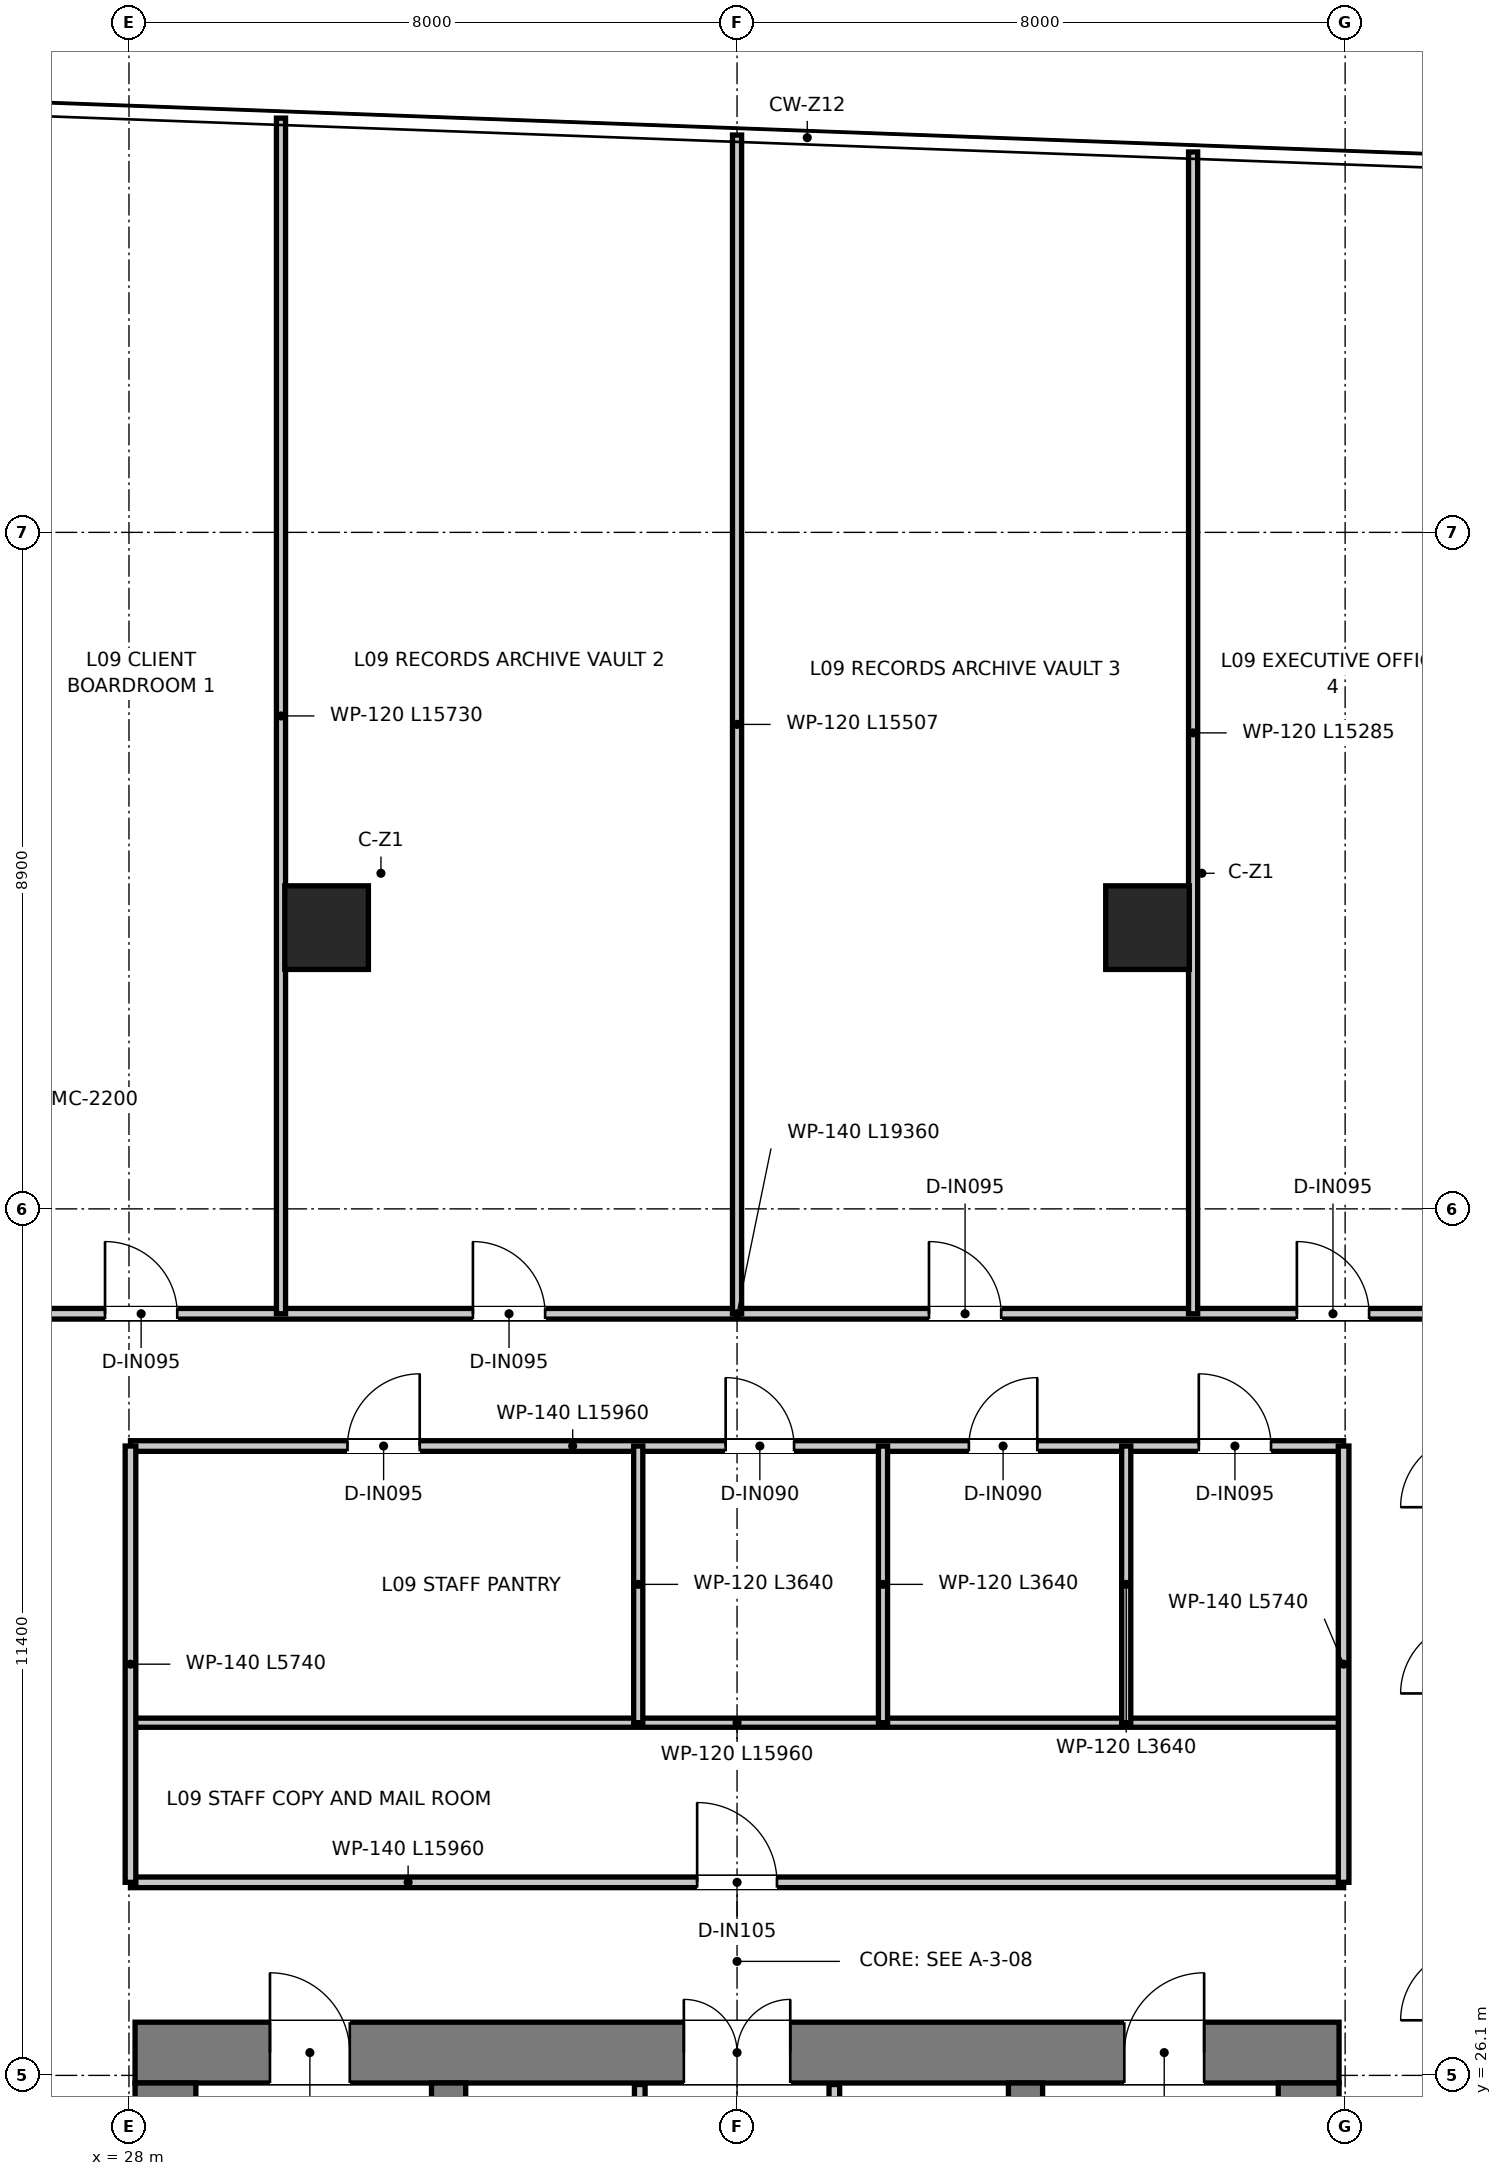
"""IFC4 building model, lengths in metres.
Left out: names, types, materials, properties, quantities, classifications, styles, units other than length and angle.
Written with IfcOpenShell. Run it as: python <this file> out.ifc"""

import sys

from ifc_helpers import new_model, si_unit, direction, frame, frame_2d, origin, origin_2d, place, context, subcontext, project, spatial, rectangle, extrude, source, transform, mapped, element, fill, save


model = new_model("IFC4")
c1 = context("Model", 3, precision=1e-05, world=origin(), true_north=direction((0.0, 1.0)))
c2 = subcontext(c1, "Body", "Model", "MODEL_VIEW")
j1 = project(units=[si_unit("LENGTHUNIT", "METRE"), si_unit("PLANEANGLEUNIT", "RADIAN")], contexts=[c1])
p1 = place(None, origin())
s1 = spatial("IfcSite", under=j1, at=p1, CompositionType="ELEMENT")
p2 = place(p1, origin())
s2 = spatial("IfcBuilding", under=s1, at=p2, CompositionType="ELEMENT")
p3 = place(p2, frame((0.0, 0.0, 40.8)))
s3 = spatial("IfcBuildingStorey", under=s2, at=p3, CompositionType="ELEMENT", Elevation=40.8)
p4 = place(p3, frame((28.08, 26.4, 0.0), z_axis=(0.0, 0.0, 1.0), x_axis=(1.0, 0.0, 0.0)))
e1 = element("IfcWall", 1, at=p4, inside=s3, PredefinedType="SHEAR", context=c2, shape_type="SweptSolid", body=[
    extrude(rectangle(XDim=15.84, YDim=0.8, at=frame_2d((7.92, 0.0))), origin(), (0.0, 0.0, 1.0), 3.95),
])
p5 = place(p4, frame((7.22, 0.0, 0.0)))
e2 = element("IfcOpeningElement", 2, at=p5, cuts=e1, PredefinedType="OPENING", context=c2, shape_type="SweptSolid", body=[
    extrude(rectangle(XDim=1.4, YDim=2.2, at=frame_2d((0.7, 1.1))), frame((0.0, 0.41, 0.0), z_axis=(0.0, -1.0, 0.0), x_axis=(1.0, 0.0, 0.0)), (0.0, 0.0, 1.0), 0.82),
])
p6 = place(p4, frame((1.775, 0.0, 0.0)))
e3 = element("IfcOpeningElement", 3, at=p6, cuts=e1, PredefinedType="OPENING", context=c2, shape_type="SweptSolid", body=[
    extrude(rectangle(XDim=1.05, YDim=2.1, at=frame_2d((0.525, 1.05))), frame((0.0, 0.41, 0.0), z_axis=(0.0, -1.0, 0.0), x_axis=(1.0, 0.0, 0.0)), (0.0, 0.0, 1.0), 0.82),
])
p7 = place(p4, frame((13.015, 0.0, 0.0)))
e4 = element("IfcOpeningElement", 4, at=p7, cuts=e1, PredefinedType="OPENING", context=c2, shape_type="SweptSolid", body=[
    extrude(rectangle(XDim=1.05, YDim=2.1, at=frame_2d((0.525, 1.05))), frame((0.0, 0.41, 0.0), z_axis=(0.0, -1.0, 0.0), x_axis=(1.0, 0.0, 0.0)), (0.0, 0.0, 1.0), 0.82),
])
for number, where, z_axis, x_axis in (
    (5, (28.48, 11.3, 0.0), (0.0, 0.0, 1.0), (0.0, 1.0, 0.0)),
    (6, (43.52, 11.3, 0.0), (0.0, 0.0, 1.0), (0.0, 1.0, 0.0)),
):
    element("IfcWall", number, at=place(p3, frame(where, z_axis=z_axis, x_axis=x_axis)), inside=s3, PredefinedType="SHEAR", context=c2, shape_type="SweptSolid", body=[
        extrude(rectangle(XDim=14.7, YDim=0.8, at=frame_2d((7.35, 0.0))), origin(), (0.0, 0.0, 1.0), 3.95),
    ])
p8 = place(p3, frame((32.205, 13.22, 0.0), z_axis=(0.0, 0.0, 1.0), x_axis=(0.0, 1.0, 0.0)))
e7 = element("IfcWall", 7, at=p8, inside=s3, PredefinedType="SHEAR", context=c2, shape_type="SweptSolid", body=[
    extrude(rectangle(XDim=12.78, YDim=0.45, at=frame_2d((6.39, 0.0))), origin(), (0.0, 0.0, 1.0), 3.95),
])
p9 = place(p8, frame((10.58, 0.0, 0.0)))
e8 = element("IfcOpeningElement", 8, at=p9, cuts=e7, PredefinedType="OPENING", context=c2, shape_type="SweptSolid", body=[
    extrude(rectangle(XDim=1.1, YDim=2.15, at=frame_2d((0.55, 1.075))), frame((0.0, 0.235, 0.0), z_axis=(0.0, -1.0, 0.0), x_axis=(1.0, 0.0, 0.0)), (0.0, 0.0, 1.0), 0.47),
])
p10 = place(p3, frame((39.795, 13.22, 0.0), z_axis=(0.0, 0.0, 1.0), x_axis=(0.0, 1.0, 0.0)))
e9 = element("IfcWall", 9, at=p10, inside=s3, PredefinedType="SHEAR", context=c2, shape_type="SweptSolid", body=[
    extrude(rectangle(XDim=12.78, YDim=0.45, at=frame_2d((6.39, 0.0))), origin(), (0.0, 0.0, 1.0), 3.95),
])
p11 = place(p10, frame((10.58, 0.0, 0.0)))
e10 = element("IfcOpeningElement", 10, at=p11, cuts=e9, PredefinedType="OPENING", context=c2, shape_type="SweptSolid", body=[
    extrude(rectangle(XDim=1.1, YDim=2.15, at=frame_2d((0.55, 1.075))), frame((0.0, 0.235, 0.0), z_axis=(0.0, -1.0, 0.0), x_axis=(1.0, 0.0, 0.0)), (0.0, 0.0, 1.0), 0.47),
])
m1 = source(origin(), c2, "Body", "SweptSolid", [
    extrude(rectangle(XDim=1.1, YDim=1.1, at=origin_2d()), origin(), (0.0, 0.0, 1.0), 3.95),
])
for number, where, z_axis, x_axis in (
    (11, (30.6, 41.2, 0.0), (0.0, 0.0, 1.0), (1.0, 0.0, 0.0)),
    (12, (41.4, 41.2, 0.0), (0.0, 0.0, 1.0), (1.0, 0.0, 0.0)),
):
    element("IfcColumn", number, at=place(p3, frame(where, z_axis=z_axis, x_axis=x_axis)), inside=s3, PredefinedType="COLUMN", context=c2, shape_type="MappedRepresentation", body=[
        mapped(m1, transform((0.0, 0.0, 0.0), x_axis=(1.0, 0.0, 0.0), y_axis=(0.0, 1.0, 0.0), z_axis=(0.0, 0.0, 1.0), scale=1.0)),
    ])
p12 = place(p3, frame((34.72, 20.2, 0.0), z_axis=(0.0, 0.0, 1.0), x_axis=(0.0, 1.0, 0.0)))
e13 = element("IfcWall", 13, at=p12, inside=s3, PredefinedType="PARTITIONING", context=c2, shape_type="SweptSolid", body=[
    extrude(rectangle(XDim=5.78, YDim=0.14, at=frame_2d((2.89, 0.0))), origin(), (0.0, 0.0, 1.0), 2.47),
])
p13 = place(p12, frame((1.05, 0.0, 0.0)))
e14 = element("IfcOpeningElement", 14, at=p13, cuts=e13, PredefinedType="OPENING", context=c2, shape_type="SweptSolid", body=[
    extrude(rectangle(XDim=0.9, YDim=2.1, at=frame_2d((0.45, 1.05))), frame((0.0, 0.08, 0.0), z_axis=(0.0, -1.0, 0.0), x_axis=(1.0, 0.0, 0.0)), (0.0, 0.0, 1.0), 0.16),
])
p14 = place(p3, frame((37.28, 20.2, 0.0), z_axis=(0.0, 0.0, 1.0), x_axis=(0.0, 1.0, 0.0)))
e15 = element("IfcWall", 15, at=p14, inside=s3, PredefinedType="PARTITIONING", context=c2, shape_type="SweptSolid", body=[
    extrude(rectangle(XDim=5.78, YDim=0.14, at=frame_2d((2.89, 0.0))), origin(), (0.0, 0.0, 1.0), 2.47),
])
p15 = place(p14, frame((0.95, 0.0, 0.0)))
e16 = element("IfcOpeningElement", 16, at=p15, cuts=e15, PredefinedType="OPENING", context=c2, shape_type="SweptSolid", body=[
    extrude(rectangle(XDim=1.1, YDim=2.15, at=frame_2d((0.55, 1.075))), frame((0.0, 0.08, 0.0), z_axis=(0.0, -1.0, 0.0), x_axis=(1.0, 0.0, 0.0)), (0.0, 0.0, 1.0), 0.16),
])
p16 = place(p3, frame((28.02, 28.64, 0.0), z_axis=(0.0, 0.0, 1.0), x_axis=(1.0, 0.0, 0.0)))
e17 = element("IfcWall", 17, at=p16, inside=s3, PredefinedType="PARTITIONING", context=c2, shape_type="SweptSolid", body=[
    extrude(rectangle(XDim=15.96, YDim=0.14, at=frame_2d((7.98, 0.0))), origin(), (0.0, 0.0, 1.0), 3.08),
])
p17 = place(p16, frame((7.455, 0.0, 0.0)))
e18 = element("IfcOpeningElement", 18, at=p17, cuts=e17, PredefinedType="OPENING", context=c2, shape_type="SweptSolid", body=[
    extrude(rectangle(XDim=1.05, YDim=2.15, at=frame_2d((0.525, 1.075))), frame((0.0, 0.08, 0.0), z_axis=(0.0, -1.0, 0.0), x_axis=(1.0, 0.0, 0.0)), (0.0, 0.0, 1.0), 0.16),
])
p18 = place(p3, frame((28.02, 30.74, 0.0), z_axis=(0.0, 0.0, 1.0), x_axis=(1.0, 0.0, 0.0)))
e19 = element("IfcWall", 19, at=p18, inside=s3, PredefinedType="PARTITIONING", context=c2, shape_type="SweptSolid", body=[
    extrude(rectangle(XDim=15.96, YDim=0.12, at=frame_2d((7.98, 0.0))), origin(), (0.0, 0.0, 1.0), 3.08),
])
p19 = place(p3, frame((28.02, 34.38, 0.0), z_axis=(0.0, 0.0, 1.0), x_axis=(1.0, 0.0, 0.0)))
e20 = element("IfcWall", 20, at=p19, inside=s3, PredefinedType="PARTITIONING", context=c2, shape_type="SweptSolid", body=[
    extrude(rectangle(XDim=15.96, YDim=0.14, at=frame_2d((7.98, 0.0))), origin(), (0.0, 0.0, 1.0), 3.08),
])
p20 = place(p19, frame((7.83, 0.0, 0.0)))
e21 = element("IfcOpeningElement", 21, at=p20, cuts=e20, PredefinedType="OPENING", context=c2, shape_type="SweptSolid", body=[
    extrude(rectangle(XDim=0.9, YDim=2.1, at=frame_2d((0.45, 1.05))), frame((0.0, 0.08, 0.0), z_axis=(0.0, -1.0, 0.0), x_axis=(1.0, 0.0, 0.0)), (0.0, 0.0, 1.0), 0.16),
])
p21 = place(p19, frame((11.03, 0.0, 0.0)))
e22 = element("IfcOpeningElement", 22, at=p21, cuts=e20, PredefinedType="OPENING", context=c2, shape_type="SweptSolid", body=[
    extrude(rectangle(XDim=0.9, YDim=2.1, at=frame_2d((0.45, 1.05))), frame((0.0, 0.08, 0.0), z_axis=(0.0, -1.0, 0.0), x_axis=(1.0, 0.0, 0.0)), (0.0, 0.0, 1.0), 0.16),
])
p22 = place(p19, frame((14.055, 0.0, 0.0)))
e23 = element("IfcOpeningElement", 23, at=p22, cuts=e20, PredefinedType="OPENING", context=c2, shape_type="SweptSolid", body=[
    extrude(rectangle(XDim=0.95, YDim=2.1, at=frame_2d((0.475, 1.05))), frame((0.0, 0.08, 0.0), z_axis=(0.0, -1.0, 0.0), x_axis=(1.0, 0.0, 0.0)), (0.0, 0.0, 1.0), 0.16),
])
p23 = place(p19, frame((2.855, 0.0, 0.0)))
e24 = element("IfcOpeningElement", 24, at=p23, cuts=e20, PredefinedType="OPENING", context=c2, shape_type="SweptSolid", body=[
    extrude(rectangle(XDim=0.95, YDim=2.1, at=frame_2d((0.475, 1.05))), frame((0.0, 0.08, 0.0), z_axis=(0.0, -1.0, 0.0), x_axis=(1.0, 0.0, 0.0)), (0.0, 0.0, 1.0), 0.16),
])
for number, where, z_axis, x_axis in (
    (25, (28.02, 28.64, 0.0), (0.0, 0.0, 1.0), (0.0, 1.0, 0.0)),
    (26, (43.98, 28.64, 0.0), (0.0, 0.0, 1.0), (0.0, 1.0, 0.0)),
):
    element("IfcWall", number, at=place(p3, frame(where, z_axis=z_axis, x_axis=x_axis)), inside=s3, PredefinedType="PARTITIONING", context=c2, shape_type="SweptSolid", body=[
        extrude(rectangle(XDim=5.74, YDim=0.14, at=frame_2d((2.87, 0.0))), origin(), (0.0, 0.0, 1.0), 3.22),
    ])
for number, where, z_axis, x_axis in (
    (27, (37.92, 30.74, 0.0), (0.0, 0.0, 1.0), (0.0, 1.0, 0.0)),
    (28, (41.12, 30.74, 0.0), (0.0, 0.0, 1.0), (0.0, 1.0, 0.0)),
    (29, (34.7, 30.74, 0.0), (0.0, 0.0, 1.0), (0.0, 1.0, 0.0)),
):
    element("IfcWall", number, at=place(p3, frame(where, z_axis=z_axis, x_axis=x_axis)), inside=s3, PredefinedType="PARTITIONING", context=c2, shape_type="SweptSolid", body=[
        extrude(rectangle(XDim=3.64, YDim=0.12, at=frame_2d((1.82, 0.0))), origin(), (0.0, 0.0, 1.0), 3.12),
    ])
p24 = place(p3, frame((26.32, 36.12, 0.0), z_axis=(0.0, 0.0, 1.0), x_axis=(1.0, 0.0, 0.0)))
e30 = element("IfcWall", 30, at=p24, inside=s3, PredefinedType="PARTITIONING", context=c2, shape_type="SweptSolid", body=[
    extrude(rectangle(XDim=19.36, YDim=0.14, at=frame_2d((9.68, 0.0))), origin(), (0.0, 0.0, 1.0), 3.08),
])
p25 = place(p24, frame((1.365, 0.0, 0.0)))
e31 = element("IfcOpeningElement", 31, at=p25, cuts=e30, PredefinedType="OPENING", context=c2, shape_type="SweptSolid", body=[
    extrude(rectangle(XDim=0.95, YDim=2.1, at=frame_2d((0.475, 1.05))), frame((0.0, 0.08, 0.0), z_axis=(0.0, -1.0, 0.0), x_axis=(1.0, 0.0, 0.0)), (0.0, 0.0, 1.0), 0.16),
])
p26 = place(p24, frame((6.205, 0.0, 0.0)))
e32 = element("IfcOpeningElement", 32, at=p26, cuts=e30, PredefinedType="OPENING", context=c2, shape_type="SweptSolid", body=[
    extrude(rectangle(XDim=0.95, YDim=2.1, at=frame_2d((0.475, 1.05))), frame((0.0, 0.08, 0.0), z_axis=(0.0, -1.0, 0.0), x_axis=(1.0, 0.0, 0.0)), (0.0, 0.0, 1.0), 0.16),
])
p27 = place(p24, frame((12.205, 0.0, 0.0)))
e33 = element("IfcOpeningElement", 33, at=p27, cuts=e30, PredefinedType="OPENING", context=c2, shape_type="SweptSolid", body=[
    extrude(rectangle(XDim=0.95, YDim=2.1, at=frame_2d((0.475, 1.05))), frame((0.0, 0.08, 0.0), z_axis=(0.0, -1.0, 0.0), x_axis=(1.0, 0.0, 0.0)), (0.0, 0.0, 1.0), 0.16),
])
p28 = place(p24, frame((17.045, 0.0, 0.0)))
e34 = element("IfcOpeningElement", 34, at=p28, cuts=e30, PredefinedType="OPENING", context=c2, shape_type="SweptSolid", body=[
    extrude(rectangle(XDim=0.95, YDim=2.1, at=frame_2d((0.475, 1.05))), frame((0.0, 0.08, 0.0), z_axis=(0.0, -1.0, 0.0), x_axis=(1.0, 0.0, 0.0)), (0.0, 0.0, 1.0), 0.16),
])
p29 = place(p3, frame((30.0, 36.12, 0.0), z_axis=(0.0, 0.0, 1.0), x_axis=(0.0, 1.0, 0.0)))
e35 = element("IfcWall", 35, at=p29, inside=s3, PredefinedType="PARTITIONING", context=c2, shape_type="SweptSolid", body=[
    extrude(rectangle(XDim=15.73, YDim=0.12, at=frame_2d((7.865, 0.0))), origin(), (0.0, 0.0, 1.0), 2.97),
])
p30 = place(p3, frame((36.0, 36.12, 0.0), z_axis=(0.0, 0.0, 1.0), x_axis=(0.0, 1.0, 0.0)))
e36 = element("IfcWall", 36, at=p30, inside=s3, PredefinedType="PARTITIONING", context=c2, shape_type="SweptSolid", body=[
    extrude(rectangle(XDim=15.507, YDim=0.12, at=frame_2d((7.753, 0.0))), origin(), (0.0, 0.0, 1.0), 2.97),
])
p31 = place(p3, frame((42.0, 36.12, 0.0), z_axis=(0.0, 0.0, 1.0), x_axis=(0.0, 1.0, 0.0)))
e37 = element("IfcWall", 37, at=p31, inside=s3, PredefinedType="PARTITIONING", context=c2, shape_type="SweptSolid", body=[
    extrude(rectangle(XDim=15.284, YDim=0.12, at=frame_2d((7.642, 0.0))), origin(), (0.0, 0.0, 1.0), 2.97),
])
p32 = place(p5, origin())
e38 = element("IfcDoor", 38, at=p32, inside=s3, OperationType="DOUBLE_DOOR_SINGLE_SWING", PredefinedType="DOOR", context=c2, shape_type="SweptSolid", body=[
    extrude(rectangle(XDim=1.4, YDim=2.2, at=frame_2d((0.7, 1.1))), frame((0.0, 0.025, 0.0), z_axis=(0.0, -1.0, 0.0), x_axis=(1.0, 0.0, 0.0)), (0.0, 0.0, 1.0), 0.05),
])
fill(e2, e38)
p33 = place(p6, origin())
e39 = element("IfcDoor", 39, at=p33, inside=s3, OperationType="SINGLE_SWING_LEFT", PredefinedType="DOOR", context=c2, shape_type="SweptSolid", body=[
    extrude(rectangle(XDim=1.05, YDim=2.1, at=frame_2d((0.525, 1.05))), frame((0.0, 0.025, 0.0), z_axis=(0.0, -1.0, 0.0), x_axis=(1.0, 0.0, 0.0)), (0.0, 0.0, 1.0), 0.05),
])
fill(e3, e39)
p34 = place(p7, origin())
e40 = element("IfcDoor", 40, at=p34, inside=s3, OperationType="SINGLE_SWING_RIGHT", PredefinedType="DOOR", context=c2, shape_type="SweptSolid", body=[
    extrude(rectangle(XDim=1.05, YDim=2.1, at=frame_2d((0.525, 1.05))), frame((0.0, 0.025, 0.0), z_axis=(0.0, -1.0, 0.0), x_axis=(1.0, 0.0, 0.0)), (0.0, 0.0, 1.0), 0.05),
])
fill(e4, e40)
p35 = place(p17, origin())
e41 = element("IfcDoor", 41, at=p35, inside=s3, OperationType="SINGLE_SWING_LEFT", PredefinedType="DOOR", context=c2, shape_type="SweptSolid", body=[
    extrude(rectangle(XDim=1.05, YDim=2.15, at=frame_2d((0.525, 1.075))), frame((0.0, 0.025, 0.0), z_axis=(0.0, -1.0, 0.0), x_axis=(1.0, 0.0, 0.0)), (0.0, 0.0, 1.0), 0.05),
])
fill(e18, e41)
p36 = place(p20, origin())
e42 = element("IfcDoor", 42, at=p36, inside=s3, OperationType="SINGLE_SWING_LEFT", PredefinedType="DOOR", context=c2, shape_type="SweptSolid", body=[
    extrude(rectangle(XDim=0.9, YDim=2.1, at=frame_2d((0.45, 1.05))), frame((0.0, 0.025, 0.0), z_axis=(0.0, -1.0, 0.0), x_axis=(1.0, 0.0, 0.0)), (0.0, 0.0, 1.0), 0.05),
])
fill(e21, e42)
p37 = place(p21, origin())
e43 = element("IfcDoor", 43, at=p37, inside=s3, OperationType="SINGLE_SWING_RIGHT", PredefinedType="DOOR", context=c2, shape_type="SweptSolid", body=[
    extrude(rectangle(XDim=0.9, YDim=2.1, at=frame_2d((0.45, 1.05))), frame((0.0, 0.025, 0.0), z_axis=(0.0, -1.0, 0.0), x_axis=(1.0, 0.0, 0.0)), (0.0, 0.0, 1.0), 0.05),
])
fill(e22, e43)
p38 = place(p22, origin())
e44 = element("IfcDoor", 44, at=p38, inside=s3, OperationType="SINGLE_SWING_LEFT", PredefinedType="DOOR", context=c2, shape_type="SweptSolid", body=[
    extrude(rectangle(XDim=0.95, YDim=2.1, at=frame_2d((0.475, 1.05))), frame((0.0, 0.025, 0.0), z_axis=(0.0, -1.0, 0.0), x_axis=(1.0, 0.0, 0.0)), (0.0, 0.0, 1.0), 0.05),
])
fill(e23, e44)
p39 = place(p23, origin())
e45 = element("IfcDoor", 45, at=p39, inside=s3, OperationType="SINGLE_SWING_RIGHT", PredefinedType="DOOR", context=c2, shape_type="SweptSolid", body=[
    extrude(rectangle(XDim=0.95, YDim=2.1, at=frame_2d((0.475, 1.05))), frame((0.0, 0.025, 0.0), z_axis=(0.0, -1.0, 0.0), x_axis=(1.0, 0.0, 0.0)), (0.0, 0.0, 1.0), 0.05),
])
fill(e24, e45)
p40 = place(p25, origin())
e46 = element("IfcDoor", 46, at=p40, inside=s3, OperationType="SINGLE_SWING_LEFT", PredefinedType="DOOR", context=c2, shape_type="SweptSolid", body=[
    extrude(rectangle(XDim=0.95, YDim=2.1, at=frame_2d((0.475, 1.05))), frame((0.0, 0.025, 0.0), z_axis=(0.0, -1.0, 0.0), x_axis=(1.0, 0.0, 0.0)), (0.0, 0.0, 1.0), 0.05),
])
fill(e31, e46)
p41 = place(p26, origin())
e47 = element("IfcDoor", 47, at=p41, inside=s3, OperationType="SINGLE_SWING_LEFT", PredefinedType="DOOR", context=c2, shape_type="SweptSolid", body=[
    extrude(rectangle(XDim=0.95, YDim=2.1, at=frame_2d((0.475, 1.05))), frame((0.0, 0.025, 0.0), z_axis=(0.0, -1.0, 0.0), x_axis=(1.0, 0.0, 0.0)), (0.0, 0.0, 1.0), 0.05),
])
fill(e32, e47)
p42 = place(p27, origin())
e48 = element("IfcDoor", 48, at=p42, inside=s3, OperationType="SINGLE_SWING_LEFT", PredefinedType="DOOR", context=c2, shape_type="SweptSolid", body=[
    extrude(rectangle(XDim=0.95, YDim=2.1, at=frame_2d((0.475, 1.05))), frame((0.0, 0.025, 0.0), z_axis=(0.0, -1.0, 0.0), x_axis=(1.0, 0.0, 0.0)), (0.0, 0.0, 1.0), 0.05),
])
fill(e33, e48)
p43 = place(p28, origin())
e49 = element("IfcDoor", 49, at=p43, inside=s3, OperationType="SINGLE_SWING_LEFT", PredefinedType="DOOR", context=c2, shape_type="SweptSolid", body=[
    extrude(rectangle(XDim=0.95, YDim=2.1, at=frame_2d((0.475, 1.05))), frame((0.0, 0.025, 0.0), z_axis=(0.0, -1.0, 0.0), x_axis=(1.0, 0.0, 0.0)), (0.0, 0.0, 1.0), 0.05),
])
fill(e34, e49)
save(model, sys.argv[1])
